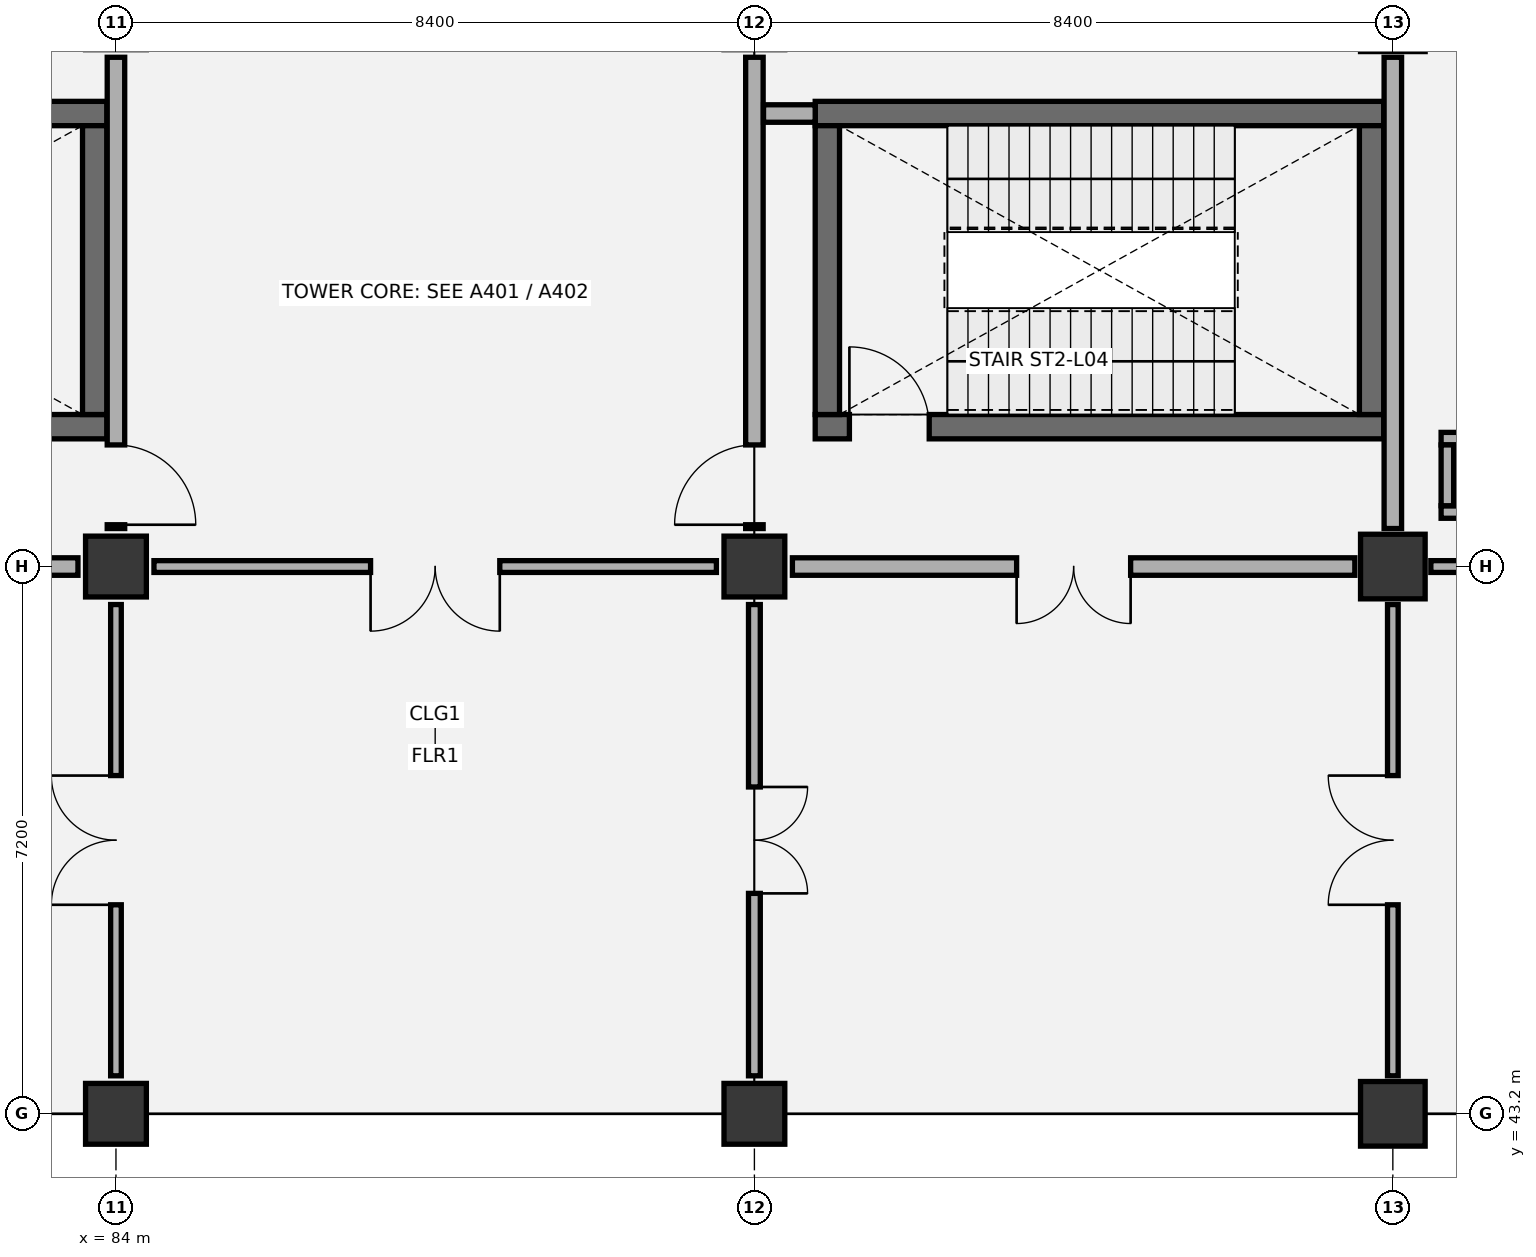
"""IFC4 building model, lengths in metres.
Left out: names, types, materials, properties, quantities, classifications, styles, units other than length and angle.
Written with IfcOpenShell. Run it as: python <this file> out.ifc"""

import sys

from ifc_helpers import new_model, si_unit, direction, frame, frame_2d, origin, origin_2d, place, context, subcontext, project, spatial, rectangle, extrude, element, fill, save


model = new_model("IFC4")
c1 = context("Model", 3, precision=1e-05, world=origin(), true_north=direction((0.0, 1.0)))
c2 = subcontext(c1, "Body", "Model", "MODEL_VIEW")
j1 = project(units=[si_unit("LENGTHUNIT", "METRE"), si_unit("PLANEANGLEUNIT", "RADIAN")], contexts=[c1])
p1 = place(None, origin())
s1 = spatial("IfcSite", under=j1, at=p1, CompositionType="ELEMENT")
p2 = place(p1, origin())
s2 = spatial("IfcBuilding", under=s1, at=p2, CompositionType="ELEMENT")
p3 = place(p2, frame((0.0, 0.0, 22.2)))
s3 = spatial("IfcBuildingStorey", under=s2, at=p3, CompositionType="ELEMENT", Elevation=22.2)
for number, where, z_axis, x_axis in (
    (1, (84.0, 43.2, 0.0), (0.0, 0.0, 1.0), (1.0, 0.0, 0.0)),
    (2, (84.0, 50.4, 0.0), (0.0, 0.0, 1.0), (1.0, 0.0, 0.0)),
    (3, (92.4, 43.2, 0.0), (0.0, 0.0, 1.0), (1.0, 0.0, 0.0)),
    (4, (92.4, 50.4, 0.0), (0.0, 0.0, 1.0), (1.0, 0.0, 0.0)),
):
    element("IfcColumn", number, at=place(p3, frame(where, z_axis=z_axis, x_axis=x_axis)), inside=s3, PredefinedType="COLUMN", context=c2, shape_type="SweptSolid", body=[
        extrude(rectangle(XDim=0.8, YDim=0.8, at=origin_2d()), origin(), (0.0, 0.0, 1.0), 4.8),
    ])
for number, where, z_axis, x_axis in (
    (5, (100.8, 43.2, 0.0), (0.0, 0.0, 1.0), (1.0, 0.0, 0.0)),
    (6, (100.8, 50.4, 0.0), (0.0, 0.0, 1.0), (1.0, 0.0, 0.0)),
):
    element("IfcColumn", number, at=place(p3, frame(where, z_axis=z_axis, x_axis=x_axis)), inside=s3, PredefinedType="COLUMN", context=c2, shape_type="SweptSolid", body=[
        extrude(rectangle(XDim=0.85, YDim=0.85, at=origin_2d()), origin(), (0.0, 0.0, 1.0), 4.8),
    ])
p4 = place(p3, frame((76.4, 52.24, 0.0), z_axis=(0.0, 0.0, 1.0), x_axis=(1.0, 0.0, 0.0)))
e7 = element("IfcWall", 7, at=p4, inside=s3, PredefinedType="SHEAR", context=c2, shape_type="SweptSolid", body=[
    extrude(rectangle(XDim=7.48, YDim=0.32, at=frame_2d((3.74, 0.0))), origin(), (0.0, 0.0, 1.0), 4.52),
])
p5 = place(p4, frame((0.45, 0.0, 0.0)))
e8 = element("IfcOpeningElement", 8, at=p5, cuts=e7, PredefinedType="OPENING", context=c2, shape_type="SweptSolid", body=[
    extrude(rectangle(XDim=1.05, YDim=2.15, at=frame_2d((0.525, 1.075))), frame((0.0, 0.17, 0.0), z_axis=(0.0, -1.0, 0.0), x_axis=(1.0, 0.0, 0.0)), (0.0, 0.0, 1.0), 0.34),
])
p6 = place(p3, frame((76.4, 56.36, 0.0), z_axis=(0.0, 0.0, 1.0), x_axis=(1.0, 0.0, 0.0)))
e9 = element("IfcWall", 9, at=p6, inside=s3, PredefinedType="SHEAR", context=c2, shape_type="SweptSolid", body=[
    extrude(rectangle(XDim=7.48, YDim=0.32, at=frame_2d((3.74, 0.0))), origin(), (0.0, 0.0, 1.0), 4.52),
])
p7 = place(p3, frame((83.72, 52.4, 0.0), z_axis=(0.0, 0.0, 1.0), x_axis=(0.0, 1.0, 0.0)))
e10 = element("IfcWall", 10, at=p7, inside=s3, PredefinedType="SHEAR", context=c2, shape_type="SweptSolid", body=[
    extrude(rectangle(XDim=3.8, YDim=0.32, at=frame_2d((1.9, 0.0))), origin(), (0.0, 0.0, 1.0), 4.52),
])
p8 = place(p3, frame((93.2, 52.24, 0.0), z_axis=(0.0, 0.0, 1.0), x_axis=(1.0, 0.0, 0.0)))
e11 = element("IfcWall", 11, at=p8, inside=s3, PredefinedType="SHEAR", context=c2, shape_type="SweptSolid", body=[
    extrude(rectangle(XDim=7.48, YDim=0.32, at=frame_2d((3.74, 0.0))), origin(), (0.0, 0.0, 1.0), 4.52),
])
p9 = place(p8, frame((0.45, 0.0, 0.0)))
e12 = element("IfcOpeningElement", 12, at=p9, cuts=e11, PredefinedType="OPENING", context=c2, shape_type="SweptSolid", body=[
    extrude(rectangle(XDim=1.05, YDim=2.15, at=frame_2d((0.525, 1.075))), frame((0.0, 0.17, 0.0), z_axis=(0.0, -1.0, 0.0), x_axis=(1.0, 0.0, 0.0)), (0.0, 0.0, 1.0), 0.34),
])
p10 = place(p3, frame((93.2, 56.36, 0.0), z_axis=(0.0, 0.0, 1.0), x_axis=(1.0, 0.0, 0.0)))
e13 = element("IfcWall", 13, at=p10, inside=s3, PredefinedType="SHEAR", context=c2, shape_type="SweptSolid", body=[
    extrude(rectangle(XDim=7.48, YDim=0.32, at=frame_2d((3.74, 0.0))), origin(), (0.0, 0.0, 1.0), 4.52),
])
for number, where, z_axis, x_axis in (
    (14, (93.36, 52.4, 0.0), (0.0, 0.0, 1.0), (0.0, 1.0, 0.0)),
    (15, (100.52, 52.4, 0.0), (0.0, 0.0, 1.0), (0.0, 1.0, 0.0)),
):
    element("IfcWall", number, at=place(p3, frame(where, z_axis=z_axis, x_axis=x_axis)), inside=s3, PredefinedType="SHEAR", context=c2, shape_type="SweptSolid", body=[
        extrude(rectangle(XDim=3.8, YDim=0.32, at=frame_2d((1.9, 0.0))), origin(), (0.0, 0.0, 1.0), 4.52),
    ])
for number, where, z_axis, x_axis in (
    (16, (101.435, 51.117, 0.0), (0.0, 0.0, 1.0), (1.0, 0.0, 0.0)),
    (17, (101.435, 52.083, 0.0), (0.0, 0.0, 1.0), (1.0, 0.0, 0.0)),
):
    element("IfcWall", number, at=place(p3, frame(where, z_axis=z_axis, x_axis=x_axis)), inside=s3, PredefinedType="PARTITIONING", context=c2, shape_type="SweptSolid", body=[
        extrude(rectangle(XDim=1.43, YDim=0.165, at=frame_2d((0.715, 0.0))), origin(), (0.0, 0.0, 1.0), 4.52),
    ])
p11 = place(p3, frame((101.518, 51.2, 0.0), z_axis=(0.0, 0.0, 1.0), x_axis=(0.0, 1.0, 0.0)))
e18 = element("IfcWall", 18, at=p11, inside=s3, PredefinedType="PARTITIONING", context=c2, shape_type="SweptSolid", body=[
    extrude(rectangle(XDim=0.8, YDim=0.165, at=frame_2d((0.4, 0.0))), origin(), (0.0, 0.0, 1.0), 4.52),
])
p12 = place(p3, frame((84.0, 43.7, 0.0), z_axis=(0.0, 0.0, 1.0), x_axis=(0.0, 1.0, 0.0)))
e19 = element("IfcWall", 19, at=p12, inside=s3, PredefinedType="PARTITIONING", context=c2, shape_type="SweptSolid", body=[
    extrude(rectangle(XDim=6.2, YDim=0.14, at=frame_2d((3.1, 0.0))), origin(), (0.0, 0.0, 1.0), 4.225),
])
p13 = place(p12, frame((2.25, 0.0, 0.0)))
e20 = element("IfcOpeningElement", 20, at=p13, cuts=e19, PredefinedType="OPENING", context=c2, shape_type="SweptSolid", body=[
    extrude(rectangle(XDim=1.7, YDim=2.25, at=frame_2d((0.85, 1.125))), frame((0.0, 0.08, 0.0), z_axis=(0.0, -1.0, 0.0), x_axis=(1.0, 0.0, 0.0)), (0.0, 0.0, 1.0), 0.16),
])
p14 = place(p3, frame((76.1, 50.4, 0.0), z_axis=(0.0, 0.0, 1.0), x_axis=(1.0, 0.0, 0.0)))
e21 = element("IfcWall", 21, at=p14, inside=s3, PredefinedType="PARTITIONING", context=c2, shape_type="SweptSolid", body=[
    extrude(rectangle(XDim=7.4, YDim=0.23, at=frame_2d((3.7, 0.0))), origin(), (0.0, 0.0, 1.0), 3.815),
])
p15 = place(p14, frame((2.95, 0.0, 0.0)))
e22 = element("IfcOpeningElement", 22, at=p15, cuts=e21, PredefinedType="OPENING", context=c2, shape_type="SweptSolid", body=[
    extrude(rectangle(XDim=1.5, YDim=2.15, at=frame_2d((0.75, 1.075))), frame((0.0, 0.125, 0.0), z_axis=(0.0, -1.0, 0.0), x_axis=(1.0, 0.0, 0.0)), (0.0, 0.0, 1.0), 0.25),
])
p16 = place(p3, frame((84.0, 50.9, 0.0), z_axis=(0.0, 0.0, 1.0), x_axis=(0.0, 1.0, 0.0)))
e23 = element("IfcWall", 23, at=p16, inside=s3, PredefinedType="PARTITIONING", context=c2, shape_type="SweptSolid", body=[
    extrude(rectangle(XDim=6.2, YDim=0.23, at=frame_2d((3.1, 0.0))), origin(), (0.0, 0.0, 1.0), 3.865),
])
p17 = place(p16, frame((0.05, 0.0, 0.0)))
e24 = element("IfcOpeningElement", 24, at=p17, cuts=e23, PredefinedType="OPENING", context=c2, shape_type="SweptSolid", body=[
    extrude(rectangle(XDim=1.05, YDim=2.15, at=frame_2d((0.525, 1.075))), frame((0.0, 0.125, 0.0), z_axis=(0.0, -1.0, 0.0), x_axis=(1.0, 0.0, 0.0)), (0.0, 0.0, 1.0), 0.25),
])
p18 = place(p3, frame((92.4, 43.7, 0.0), z_axis=(0.0, 0.0, 1.0), x_axis=(0.0, 1.0, 0.0)))
e25 = element("IfcWall", 25, at=p18, inside=s3, PredefinedType="PARTITIONING", context=c2, shape_type="SweptSolid", body=[
    extrude(rectangle(XDim=6.2, YDim=0.155, at=frame_2d((3.1, 0.0))), origin(), (0.0, 0.0, 1.0), 3.865),
])
p19 = place(p18, frame((2.4, 0.0, 0.0)))
e26 = element("IfcOpeningElement", 26, at=p19, cuts=e25, PredefinedType="OPENING", context=c2, shape_type="SweptSolid", body=[
    extrude(rectangle(XDim=1.4, YDim=2.15, at=frame_2d((0.7, 1.075))), frame((0.0, 0.087, 0.0), z_axis=(0.0, -1.0, 0.0), x_axis=(1.0, 0.0, 0.0)), (0.0, 0.0, 1.0), 0.175),
])
p20 = place(p3, frame((84.5, 50.4, 0.0), z_axis=(0.0, 0.0, 1.0), x_axis=(1.0, 0.0, 0.0)))
e27 = element("IfcWall", 27, at=p20, inside=s3, PredefinedType="PARTITIONING", context=c2, shape_type="SweptSolid", body=[
    extrude(rectangle(XDim=7.4, YDim=0.155, at=frame_2d((3.7, 0.0))), origin(), (0.0, 0.0, 1.0), 3.815),
])
p21 = place(p20, frame((2.85, 0.0, 0.0)))
e28 = element("IfcOpeningElement", 28, at=p21, cuts=e27, PredefinedType="OPENING", context=c2, shape_type="SweptSolid", body=[
    extrude(rectangle(XDim=1.7, YDim=2.25, at=frame_2d((0.85, 1.125))), frame((0.0, 0.087, 0.0), z_axis=(0.0, -1.0, 0.0), x_axis=(1.0, 0.0, 0.0)), (0.0, 0.0, 1.0), 0.175),
])
p22 = place(p3, frame((92.4, 50.9, 0.0), z_axis=(0.0, 0.0, 1.0), x_axis=(0.0, 1.0, 0.0)))
e29 = element("IfcWall", 29, at=p22, inside=s3, PredefinedType="PARTITIONING", context=c2, shape_type="SweptSolid", body=[
    extrude(rectangle(XDim=6.2, YDim=0.23, at=frame_2d((3.1, 0.0))), origin(), (0.0, 0.0, 1.0), 4.015),
])
p23 = place(p22, frame((0.05, 0.0, 0.0)))
e30 = element("IfcOpeningElement", 30, at=p23, cuts=e29, PredefinedType="OPENING", context=c2, shape_type="SweptSolid", body=[
    extrude(rectangle(XDim=1.05, YDim=2.15, at=frame_2d((0.525, 1.075))), frame((0.0, 0.125, 0.0), z_axis=(0.0, -1.0, 0.0), x_axis=(1.0, 0.0, 0.0)), (0.0, 0.0, 1.0), 0.25),
])
p24 = place(p3, frame((100.8, 43.7, 0.0), z_axis=(0.0, 0.0, 1.0), x_axis=(0.0, 1.0, 0.0)))
e31 = element("IfcWall", 31, at=p24, inside=s3, PredefinedType="PARTITIONING", context=c2, shape_type="SweptSolid", body=[
    extrude(rectangle(XDim=6.2, YDim=0.14, at=frame_2d((3.1, 0.0))), origin(), (0.0, 0.0, 1.0), 4.015),
])
p25 = place(p24, frame((2.25, 0.0, 0.0)))
e32 = element("IfcOpeningElement", 32, at=p25, cuts=e31, PredefinedType="OPENING", context=c2, shape_type="SweptSolid", body=[
    extrude(rectangle(XDim=1.7, YDim=2.25, at=frame_2d((0.85, 1.125))), frame((0.0, 0.08, 0.0), z_axis=(0.0, -1.0, 0.0), x_axis=(1.0, 0.0, 0.0)), (0.0, 0.0, 1.0), 0.16),
])
p26 = place(p3, frame((92.9, 50.4, 0.0), z_axis=(0.0, 0.0, 1.0), x_axis=(1.0, 0.0, 0.0)))
e33 = element("IfcWall", 33, at=p26, inside=s3, PredefinedType="PARTITIONING", context=c2, shape_type="SweptSolid", body=[
    extrude(rectangle(XDim=7.4, YDim=0.23, at=frame_2d((3.7, 0.0))), origin(), (0.0, 0.0, 1.0), 3.815),
])
p27 = place(p26, frame((2.95, 0.0, 0.0)))
e34 = element("IfcOpeningElement", 34, at=p27, cuts=e33, PredefinedType="OPENING", context=c2, shape_type="SweptSolid", body=[
    extrude(rectangle(XDim=1.5, YDim=2.15, at=frame_2d((0.75, 1.075))), frame((0.0, 0.125, 0.0), z_axis=(0.0, -1.0, 0.0), x_axis=(1.0, 0.0, 0.0)), (0.0, 0.0, 1.0), 0.25),
])
p28 = place(p3, frame((100.8, 50.9, 0.0), z_axis=(0.0, 0.0, 1.0), x_axis=(0.0, 1.0, 0.0)))
e35 = element("IfcWall", 35, at=p28, inside=s3, PredefinedType="PARTITIONING", context=c2, shape_type="SweptSolid", body=[
    extrude(rectangle(XDim=6.2, YDim=0.23, at=frame_2d((3.1, 0.0))), origin(), (0.0, 0.0, 1.0), 3.865),
])
p29 = place(p3, frame((92.52, 56.36, 0.0), z_axis=(0.0, 0.0, 1.0), x_axis=(1.0, 0.0, 0.0)))
e36 = element("IfcWall", 36, at=p29, inside=s3, PredefinedType="PARTITIONING", context=c2, shape_type="SweptSolid", body=[
    extrude(rectangle(XDim=0.68, YDim=0.23, at=frame_2d((0.34, 0.0))), origin(), (0.0, 0.0, 1.0), 4.52),
])
p30 = place(p3, frame((101.3, 50.4, 0.0), z_axis=(0.0, 0.0, 1.0), x_axis=(1.0, 0.0, 0.0)))
e37 = element("IfcWall", 37, at=p30, inside=s3, PredefinedType="PARTITIONING", context=c2, shape_type="SweptSolid", body=[
    extrude(rectangle(XDim=7.4, YDim=0.155, at=frame_2d((3.7, 0.0))), origin(), (0.0, 0.0, 1.0), 3.815),
])
p31 = place(p30, frame((2.85, 0.0, 0.0)))
e38 = element("IfcOpeningElement", 38, at=p31, cuts=e37, PredefinedType="OPENING", context=c2, shape_type="SweptSolid", body=[
    extrude(rectangle(XDim=1.7, YDim=2.25, at=frame_2d((0.85, 1.125))), frame((0.0, 0.087, 0.0), z_axis=(0.0, -1.0, 0.0), x_axis=(1.0, 0.0, 0.0)), (0.0, 0.0, 1.0), 0.175),
])
p32 = place(p9, origin())
e39 = element("IfcDoor", 39, at=p32, inside=s3, OperationType="SINGLE_SWING_LEFT", PredefinedType="DOOR", context=c2, shape_type="SweptSolid", body=[
    extrude(rectangle(XDim=1.05, YDim=2.15, at=frame_2d((0.525, 1.075))), frame((0.0, 0.025, 0.0), z_axis=(0.0, -1.0, 0.0), x_axis=(1.0, 0.0, 0.0)), (0.0, 0.0, 1.0), 0.05),
])
fill(e12, e39)
p33 = place(p13, origin())
e40 = element("IfcDoor", 40, at=p33, inside=s3, OperationType="DOUBLE_DOOR_SINGLE_SWING", PredefinedType="DOOR", context=c2, shape_type="SweptSolid", body=[
    extrude(rectangle(XDim=1.7, YDim=2.25, at=frame_2d((0.85, 1.125))), frame((0.0, 0.025, 0.0), z_axis=(0.0, -1.0, 0.0), x_axis=(1.0, 0.0, 0.0)), (0.0, 0.0, 1.0), 0.05),
])
fill(e20, e40)
p34 = place(p17, frame((1.05, 0.0, 0.0), z_axis=(0.0, 0.0, 1.0), x_axis=(-1.0, 0.0, 0.0)))
e41 = element("IfcDoor", 41, at=p34, inside=s3, OperationType="SINGLE_SWING_RIGHT", PredefinedType="DOOR", context=c2, shape_type="SweptSolid", body=[
    extrude(rectangle(XDim=1.05, YDim=2.15, at=frame_2d((0.525, 1.075))), frame((0.0, 0.025, 0.0), z_axis=(0.0, -1.0, 0.0), x_axis=(1.0, 0.0, 0.0)), (0.0, 0.0, 1.0), 0.05),
])
fill(e24, e41)
p35 = place(p19, frame((1.4, 0.0, 0.0), z_axis=(0.0, 0.0, 1.0), x_axis=(-1.0, 0.0, 0.0)))
e42 = element("IfcDoor", 42, at=p35, inside=s3, OperationType="DOUBLE_DOOR_SINGLE_SWING", PredefinedType="DOOR", context=c2, shape_type="SweptSolid", body=[
    extrude(rectangle(XDim=1.4, YDim=2.15, at=frame_2d((0.7, 1.075))), frame((0.0, 0.025, 0.0), z_axis=(0.0, -1.0, 0.0), x_axis=(1.0, 0.0, 0.0)), (0.0, 0.0, 1.0), 0.05),
])
fill(e26, e42)
p36 = place(p21, frame((1.7, 0.0, 0.0), z_axis=(0.0, 0.0, 1.0), x_axis=(-1.0, 0.0, 0.0)))
e43 = element("IfcDoor", 43, at=p36, inside=s3, OperationType="DOUBLE_DOOR_SINGLE_SWING", PredefinedType="DOOR", context=c2, shape_type="SweptSolid", body=[
    extrude(rectangle(XDim=1.7, YDim=2.25, at=frame_2d((0.85, 1.125))), frame((0.0, 0.025, 0.0), z_axis=(0.0, -1.0, 0.0), x_axis=(1.0, 0.0, 0.0)), (0.0, 0.0, 1.0), 0.05),
])
fill(e28, e43)
p37 = place(p23, origin())
e44 = element("IfcDoor", 44, at=p37, inside=s3, OperationType="SINGLE_SWING_LEFT", PredefinedType="DOOR", context=c2, shape_type="SweptSolid", body=[
    extrude(rectangle(XDim=1.05, YDim=2.15, at=frame_2d((0.525, 1.075))), frame((0.0, 0.025, 0.0), z_axis=(0.0, -1.0, 0.0), x_axis=(1.0, 0.0, 0.0)), (0.0, 0.0, 1.0), 0.05),
])
fill(e30, e44)
p38 = place(p25, origin())
e45 = element("IfcDoor", 45, at=p38, inside=s3, OperationType="DOUBLE_DOOR_SINGLE_SWING", PredefinedType="DOOR", context=c2, shape_type="SweptSolid", body=[
    extrude(rectangle(XDim=1.7, YDim=2.25, at=frame_2d((0.85, 1.125))), frame((0.0, 0.025, 0.0), z_axis=(0.0, -1.0, 0.0), x_axis=(1.0, 0.0, 0.0)), (0.0, 0.0, 1.0), 0.05),
])
fill(e32, e45)
p39 = place(p27, frame((1.5, 0.0, 0.0), z_axis=(0.0, 0.0, 1.0), x_axis=(-1.0, 0.0, 0.0)))
e46 = element("IfcDoor", 46, at=p39, inside=s3, OperationType="DOUBLE_DOOR_SINGLE_SWING", PredefinedType="DOOR", context=c2, shape_type="SweptSolid", body=[
    extrude(rectangle(XDim=1.5, YDim=2.15, at=frame_2d((0.75, 1.075))), frame((0.0, 0.025, 0.0), z_axis=(0.0, -1.0, 0.0), x_axis=(1.0, 0.0, 0.0)), (0.0, 0.0, 1.0), 0.05),
])
fill(e34, e46)
save(model, sys.argv[1])
